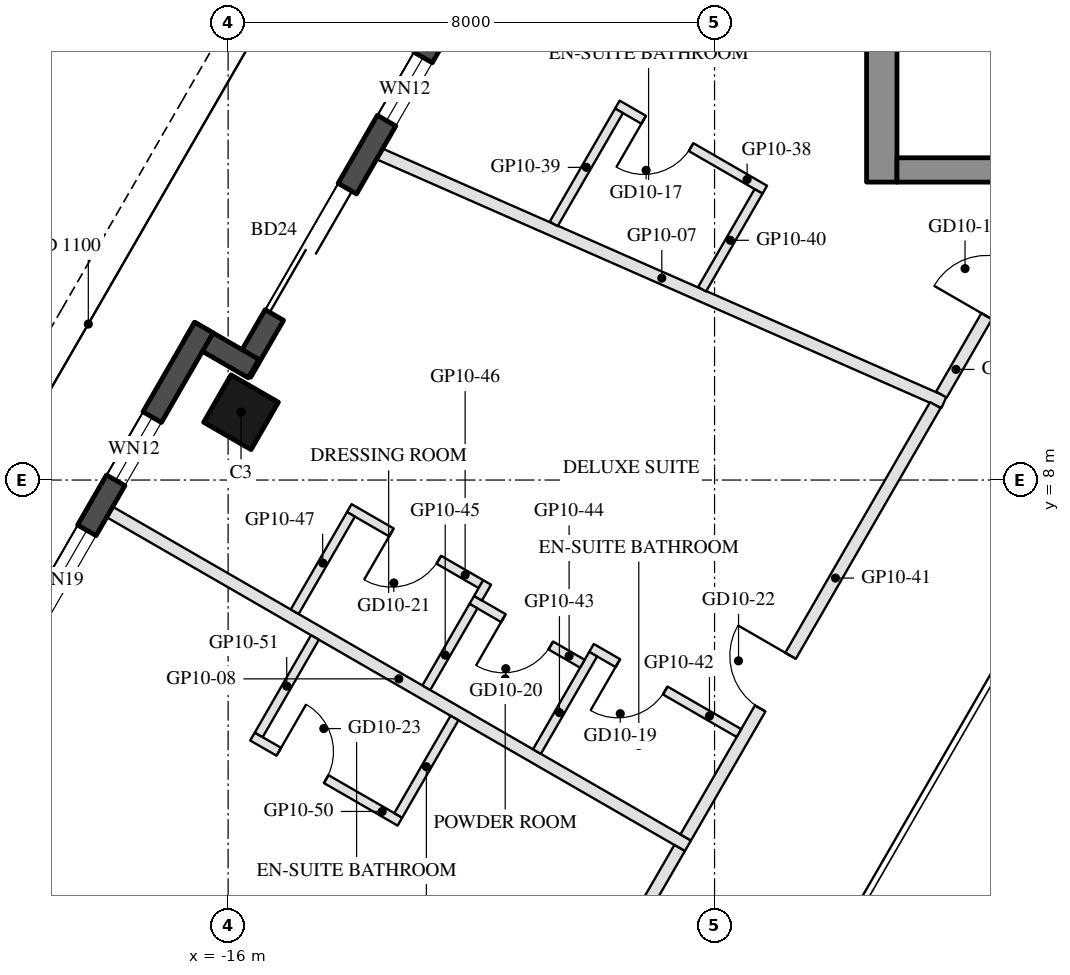
"""IFC4 building model, lengths in metres.
Left out: names, types, materials, properties, quantities, classifications, styles, units other than length and angle.
Written with IfcOpenShell. Run it as: python <this file> out.ifc"""

import sys

from ifc_helpers import new_model, si_unit, direction, frame, frame_2d, origin, origin_2d, place, context, subcontext, project, spatial, rectangle, hollow_rectangle, extrude, element, fill, save


model = new_model("IFC4")
c1 = context("Model", 3, precision=1e-05, world=origin(), true_north=direction((0.0, 1.0)))
c2 = subcontext(c1, "Body", "Model", "MODEL_VIEW")
j1 = project(units=[si_unit("LENGTHUNIT", "METRE"), si_unit("PLANEANGLEUNIT", "RADIAN")], contexts=[c1])
p1 = place(None, origin())
s1 = spatial("IfcSite", under=j1, at=p1, CompositionType="ELEMENT")
p2 = place(p1, origin())
s2 = spatial("IfcBuilding", under=s1, at=p2, CompositionType="ELEMENT")
p3 = place(p2, frame((0.0, 0.0, 120.5)))
s3 = spatial("IfcBuildingStorey", under=s2, at=p3, CompositionType="ELEMENT", Elevation=120.5)
p4 = place(p3, frame((-15.788, 9.115, 0.0), z_axis=(0.0, 0.0, 1.0), x_axis=(0.5, 0.866025403784, 0.0)))
e1 = element("IfcColumn", 1, at=p4, inside=s3, PredefinedType="COLUMN", context=c2, shape_type="SweptSolid", body=[
    extrude(hollow_rectangle(XDim=0.9, YDim=0.9, WallThickness=0.04, at=origin_2d()), origin(), (0.0, 0.0, 1.0), 3.7),
])
p5 = place(p3, frame((-12.409, 15.617, 0.0), z_axis=(0.0, 0.0, 1.0), x_axis=(-0.500003597184, -0.866023326939, 0.0)))
e2 = element("IfcWall", 2, at=p5, inside=s3, PredefinedType="SOLIDWALL", context=c2, shape_type="SweptSolid", body=[
    extrude(rectangle(XDim=6.74, YDim=0.35, at=frame_2d((3.37, 0.0))), origin(), (0.0, 0.0, 1.0), 3.55),
])
p6 = place(p5, frame((0.77, 0.0, 0.3)))
e3 = element("IfcOpeningElement", 3, at=p6, cuts=e2, PredefinedType="OPENING", context=c2, shape_type="SweptSolid", body=[
    extrude(rectangle(XDim=1.2, YDim=2.65, at=frame_2d((0.6, 1.325))), frame((0.0, 0.185, 0.0), z_axis=(0.0, -1.0, 0.0), x_axis=(1.0, 0.0, 0.0)), (0.0, 0.0, 1.0), 0.37),
])
p7 = place(p5, frame((3.26, 0.0, 0.0)))
e4 = element("IfcOpeningElement", 4, at=p7, cuts=e2, PredefinedType="OPENING", context=c2, shape_type="SweptSolid", body=[
    extrude(rectangle(XDim=2.4, YDim=2.4, at=frame_2d((1.2, 1.2))), frame((0.0, 0.185, 0.0), z_axis=(0.0, -1.0, 0.0), x_axis=(1.0, 0.0, 0.0)), (0.0, 0.0, 1.0), 0.37),
])
p8 = place(p3, frame((-15.581, 9.833, 0.0), z_axis=(0.0, 0.0, 1.0), x_axis=(-0.866055662726, 0.499947586314, 0.0)))
e5 = element("IfcWall", 5, at=p8, inside=s3, PredefinedType="SOLIDWALL", context=c2, shape_type="SweptSolid", body=[
    extrude(rectangle(XDim=1.22, YDim=0.35, at=frame_2d((0.61, 0.0))), origin(), (0.0, 0.0, 1.0), 3.55),
])
p9 = place(p3, frame((-16.398, 10.507, 0.0), z_axis=(0.0, 0.0, 1.0), x_axis=(-0.499999142773, -0.866025898704, 0.0)))
e6 = element("IfcWall", 6, at=p9, inside=s3, PredefinedType="SOLIDWALL", context=c2, shape_type="SweptSolid", body=[
    extrude(rectangle(XDim=9.7, YDim=0.35, at=frame_2d((4.85, 0.0))), origin(), (0.0, 0.0, 1.0), 3.55),
])
p10 = place(p9, frame((1.7, 0.0, 0.3)))
e7 = element("IfcOpeningElement", 7, at=p10, cuts=e6, PredefinedType="OPENING", context=c2, shape_type="SweptSolid", body=[
    extrude(rectangle(XDim=1.2, YDim=2.65, at=frame_2d((0.6, 1.325))), frame((0.0, 0.185, 0.0), z_axis=(0.0, -1.0, 0.0), x_axis=(1.0, 0.0, 0.0)), (0.0, 0.0, 1.0), 0.37),
])
p11 = place(p9, frame((3.85, 0.0, 0.3)))
e8 = element("IfcOpeningElement", 8, at=p11, cuts=e6, PredefinedType="OPENING", context=c2, shape_type="SweptSolid", body=[
    extrude(rectangle(XDim=1.9, YDim=2.65, at=frame_2d((0.95, 1.325))), frame((0.0, 0.185, 0.0), z_axis=(0.0, -1.0, 0.0), x_axis=(1.0, 0.0, 0.0)), (0.0, 0.0, 1.0), 0.37),
])
p12 = place(p9, frame((6.05, 0.0, 0.3)))
e9 = element("IfcOpeningElement", 9, at=p12, cuts=e6, PredefinedType="OPENING", context=c2, shape_type="SweptSolid", body=[
    extrude(rectangle(XDim=1.9, YDim=2.65, at=frame_2d((0.95, 1.325))), frame((0.0, 0.185, 0.0), z_axis=(0.0, -1.0, 0.0), x_axis=(1.0, 0.0, 0.0)), (0.0, 0.0, 1.0), 0.37),
])
p13 = place(p3, frame((-5.25, 12.9, 0.0), z_axis=(0.0, 0.0, 1.0), x_axis=(0.0, 1.0, 0.0)))
e10 = element("IfcWall", 10, at=p13, inside=s3, PredefinedType="SHEAR", context=c2, shape_type="SweptSolid", body=[
    extrude(rectangle(XDim=14.837, YDim=0.5, at=frame_2d((7.418, 0.0))), origin(), (0.0, 0.0, 1.0), 3.5),
])
p14 = place(p3, frame((5.0, 13.1, 0.0), z_axis=(0.0, 0.0, 1.0), x_axis=(-1.0, 0.0, 0.0)))
e11 = element("IfcWall", 11, at=p14, inside=s3, PredefinedType="SHEAR", context=c2, shape_type="SweptSolid", body=[
    extrude(rectangle(XDim=10.0, YDim=0.4, at=frame_2d((5.0, 0.0))), origin(), (0.0, 0.0, 1.0), 3.5),
])
p15 = place(p14, frame((3.55, 0.0, 0.0)))
e12 = element("IfcOpeningElement", 12, at=p15, cuts=e11, PredefinedType="OPENING", context=c2, shape_type="SweptSolid", body=[
    extrude(rectangle(XDim=1.1, YDim=2.1, at=frame_2d((0.55, 1.05))), frame((0.0, 0.21, 0.0), z_axis=(0.0, -1.0, 0.0), x_axis=(1.0, 0.0, 0.0)), (0.0, 0.0, 1.0), 0.42),
])
p16 = place(p14, frame((5.85, 0.0, 0.0)))
e13 = element("IfcOpeningElement", 13, at=p16, cuts=e11, PredefinedType="OPENING", context=c2, shape_type="SweptSolid", body=[
    extrude(rectangle(XDim=1.4, YDim=2.1, at=frame_2d((0.7, 1.05))), frame((0.0, 0.21, 0.0), z_axis=(0.0, -1.0, 0.0), x_axis=(1.0, 0.0, 0.0)), (0.0, 0.0, 1.0), 0.42),
])
p17 = place(p3, frame((-13.508, 13.363, 0.0), z_axis=(0.0, 0.0, 1.0), x_axis=(0.915297635711, -0.402778149932, 0.0)))
e14 = element("IfcWall", 14, at=p17, inside=s3, PredefinedType="PARTITIONING", context=c2, shape_type="SweptSolid", body=[
    extrude(rectangle(XDim=10.14, YDim=0.2, at=frame_2d((5.07, 0.0))), origin(), (0.0, 0.0, 1.0), 2.96),
])
p18 = place(p3, frame((-17.947, 7.475, 0.0), z_axis=(0.0, 0.0, 1.0), x_axis=(0.866027479907, -0.499996404033, 0.0)))
e15 = element("IfcWall", 15, at=p18, inside=s3, PredefinedType="PARTITIONING", context=c2, shape_type="SweptSolid", body=[
    extrude(rectangle(XDim=10.98, YDim=0.2, at=frame_2d((5.49, 0.0))), origin(), (0.0, 0.0, 1.0), 2.96),
])
p19 = place(p3, frame((-4.269, 9.406, 0.0), z_axis=(0.0, 0.0, 1.0), x_axis=(0.499968678846, 0.866043486306, 0.0)))
e16 = element("IfcWall", 16, at=p19, inside=s3, PredefinedType="PARTITIONING", context=c2, shape_type="SweptSolid", body=[
    extrude(rectangle(XDim=3.977, YDim=0.2, at=frame_2d((1.988, 0.0))), origin(), (0.0, 0.0, 1.0), 2.95),
])
p20 = place(p19, frame((1.488, 0.0, 0.0)))
e17 = element("IfcOpeningElement", 17, at=p20, cuts=e16, PredefinedType="OPENING", context=c2, shape_type="SweptSolid", body=[
    extrude(rectangle(XDim=1.0, YDim=2.1, at=frame_2d((0.5, 1.05))), frame((0.0, 0.11, 0.0), z_axis=(0.0, -1.0, 0.0), x_axis=(1.0, 0.0, 0.0)), (0.0, 0.0, 1.0), 0.22),
])
p21 = place(p3, frame((-7.174, 12.775, 0.0), z_axis=(0.0, 0.0, 1.0), x_axis=(-0.866034573852, 0.49998411664, 0.0)))
e18 = element("IfcWall", 18, at=p21, inside=s3, PredefinedType="PARTITIONING", context=c2, shape_type="SweptSolid", body=[
    extrude(rectangle(XDim=2.8, YDim=0.15, at=frame_2d((1.4, 0.0))), origin(), (0.0, 0.0, 1.0), 3.55),
])
p22 = place(p21, frame((1.4, 0.0, 0.0)))
e19 = element("IfcOpeningElement", 19, at=p22, cuts=e18, PredefinedType="OPENING", context=c2, shape_type="SweptSolid", body=[
    extrude(rectangle(XDim=0.9, YDim=2.1, at=frame_2d((0.45, 1.05))), frame((0.0, 0.085, 0.0), z_axis=(0.0, -1.0, 0.0), x_axis=(1.0, 0.0, 0.0)), (0.0, 0.0, 1.0), 0.17),
])
p23 = place(p3, frame((-9.571, 14.073, 0.0), z_axis=(0.0, 0.0, 1.0), x_axis=(-0.50005036918, -0.865996321171, 0.0)))
e20 = element("IfcWall", 20, at=p23, inside=s3, PredefinedType="PARTITIONING", context=c2, shape_type="SweptSolid", body=[
    extrude(rectangle(XDim=2.148, YDim=0.15, at=frame_2d((1.074, 0.0))), origin(), (0.0, 0.0, 1.0), 3.55),
])
p24 = place(p3, frame((-7.276, 12.748, 0.0), z_axis=(0.0, 0.0, 1.0), x_axis=(-0.500067438192, -0.865986464825, 0.0)))
e21 = element("IfcWall", 21, at=p24, inside=s3, PredefinedType="PARTITIONING", context=c2, shape_type="SweptSolid", body=[
    extrude(rectangle(XDim=1.858, YDim=0.15, at=frame_2d((0.929, 0.0))), origin(), (0.0, 0.0, 1.0), 3.55),
])
p25 = place(p3, frame((-8.475, 2.122, 0.0), z_axis=(0.0, 0.0, 1.0), x_axis=(0.500005592383, 0.866022174996, 0.0)))
e22 = element("IfcWall", 22, at=p25, inside=s3, PredefinedType="PARTITIONING", context=c2, shape_type="SweptSolid", body=[
    extrude(rectangle(XDim=8.21, YDim=0.2, at=frame_2d((4.105, 0.0))), origin(), (0.0, 0.0, 1.0), 2.95),
])
p26 = place(p25, frame((2.45, 0.0, 0.0)))
e23 = element("IfcOpeningElement", 23, at=p26, cuts=e22, PredefinedType="OPENING", context=c2, shape_type="SweptSolid", body=[
    extrude(rectangle(XDim=1.0, YDim=2.1, at=frame_2d((0.5, 1.05))), frame((0.0, 0.11, 0.0), z_axis=(0.0, -1.0, 0.0), x_axis=(1.0, 0.0, 0.0)), (0.0, 0.0, 1.0), 0.22),
])
p27 = place(p3, frame((-7.599, 3.839, 0.0), z_axis=(0.0, 0.0, 1.0), x_axis=(-0.866056369097, 0.49994636267, 0.0)))
e24 = element("IfcWall", 24, at=p27, inside=s3, PredefinedType="PARTITIONING", context=c2, shape_type="SweptSolid", body=[
    extrude(rectangle(XDim=2.8, YDim=0.15, at=frame_2d((1.4, 0.0))), origin(), (0.0, 0.0, 1.0), 3.55),
])
p28 = place(p27, frame((1.4, 0.0, 0.0)))
e25 = element("IfcOpeningElement", 25, at=p28, cuts=e24, PredefinedType="OPENING", context=c2, shape_type="SweptSolid", body=[
    extrude(rectangle(XDim=0.9, YDim=2.1, at=frame_2d((0.45, 1.05))), frame((0.0, 0.085, 0.0), z_axis=(0.0, -1.0, 0.0), x_axis=(1.0, 0.0, 0.0)), (0.0, 0.0, 1.0), 0.17),
])
p29 = place(p3, frame((-9.996, 5.136, 0.0), z_axis=(0.0, 0.0, 1.0), x_axis=(-0.499985172903, -0.866033964044, 0.0)))
e26 = element("IfcWall", 26, at=p29, inside=s3, PredefinedType="PARTITIONING", context=c2, shape_type="SweptSolid", body=[
    extrude(rectangle(XDim=1.85, YDim=0.15, at=frame_2d((0.925, 0.0))), origin(), (0.0, 0.0, 1.0), 3.55),
])
p30 = place(p3, frame((-10.174, 4.979, 0.0), z_axis=(0.0, 0.0, 1.0), x_axis=(-0.866009402589, 0.500027713859, 0.0)))
e27 = element("IfcWall", 27, at=p30, inside=s3, PredefinedType="PARTITIONING", context=c2, shape_type="SweptSolid", body=[
    extrude(rectangle(XDim=2.1, YDim=0.15, at=frame_2d((1.05, 0.0))), origin(), (0.0, 0.0, 1.0), 3.55),
])
p31 = place(p30, frame((0.6, 0.0, 0.0)))
e28 = element("IfcOpeningElement", 28, at=p31, cuts=e27, PredefinedType="OPENING", context=c2, shape_type="SweptSolid", body=[
    extrude(rectangle(XDim=0.9, YDim=2.1, at=frame_2d((0.45, 1.05))), frame((0.0, 0.085, 0.0), z_axis=(0.0, -1.0, 0.0), x_axis=(1.0, 0.0, 0.0)), (0.0, 0.0, 1.0), 0.17),
])
p32 = place(p3, frame((-11.965, 5.927, 0.0), z_axis=(0.0, 0.0, 1.0), x_axis=(-0.499899694197, -0.866083307622, 0.0)))
e29 = element("IfcWall", 29, at=p32, inside=s3, PredefinedType="PARTITIONING", context=c2, shape_type="SweptSolid", body=[
    extrude(rectangle(XDim=1.55, YDim=0.15, at=frame_2d((0.775, 0.0))), origin(), (0.0, 0.0, 1.0), 3.55),
])
p33 = place(p3, frame((-11.842, 6.289, 0.0), z_axis=(0.0, 0.0, 1.0), x_axis=(-0.866022959057, 0.500004234368, 0.0)))
e30 = element("IfcWall", 30, at=p33, inside=s3, PredefinedType="PARTITIONING", context=c2, shape_type="SweptSolid", body=[
    extrude(rectangle(XDim=2.5, YDim=0.15, at=frame_2d((1.25, 0.0))), origin(), (0.0, 0.0, 1.0), 3.55),
])
p34 = place(p33, frame((0.8, 0.0, 0.0)))
e31 = element("IfcOpeningElement", 31, at=p34, cuts=e30, PredefinedType="OPENING", context=c2, shape_type="SweptSolid", body=[
    extrude(rectangle(XDim=0.9, YDim=2.1, at=frame_2d((0.45, 1.05))), frame((0.0, 0.085, 0.0), z_axis=(0.0, -1.0, 0.0), x_axis=(1.0, 0.0, 0.0)), (0.0, 0.0, 1.0), 0.17),
])
p35 = place(p3, frame((-13.98, 7.436, 0.0), z_axis=(0.0, 0.0, 1.0), x_axis=(-0.499886193382, -0.866091100096, 0.0)))
e32 = element("IfcWall", 32, at=p35, inside=s3, PredefinedType="PARTITIONING", context=c2, shape_type="SweptSolid", body=[
    extrude(rectangle(XDim=1.85, YDim=0.15, at=frame_2d((0.925, 0.0))), origin(), (0.0, 0.0, 1.0), 3.55),
])
p36 = place(p3, frame((-11.74, 6.316, 0.0), z_axis=(0.0, 0.0, 1.0), x_axis=(-0.500426713919, -0.865778900179, 0.0)))
e33 = element("IfcWall", 33, at=p36, inside=s3, PredefinedType="PARTITIONING", context=c2, shape_type="SweptSolid", body=[
    extrude(rectangle(XDim=0.3, YDim=0.15, at=frame_2d((0.15, 0.0))), origin(), (0.0, 0.0, 1.0), 3.55),
])
p37 = place(p3, frame((-12.269, -4.45, 0.0), z_axis=(0.0, 0.0, 1.0), x_axis=(0.500009454961, 0.866019944892, 0.0)))
e34 = element("IfcWall", 34, at=p37, inside=s3, PredefinedType="PARTITIONING", context=c2, shape_type="SweptSolid", body=[
    extrude(rectangle(XDim=7.388, YDim=0.2, at=frame_2d((3.694, 0.0))), origin(), (0.0, 0.0, 1.0), 2.95),
])
p38 = place(p37, frame((3.194, 0.0, 0.0)))
e35 = element("IfcOpeningElement", 35, at=p38, cuts=e34, PredefinedType="OPENING", context=c2, shape_type="SweptSolid", body=[
    extrude(rectangle(XDim=1.0, YDim=2.1, at=frame_2d((0.5, 1.05))), frame((0.0, 0.11, 0.0), z_axis=(0.0, -1.0, 0.0), x_axis=(1.0, 0.0, 0.0)), (0.0, 0.0, 1.0), 0.22),
])
p39 = place(p3, frame((-15.599, 3.781, 0.0), z_axis=(0.0, 0.0, 1.0), x_axis=(0.866018616679, -0.500011755427, 0.0)))
e36 = element("IfcWall", 36, at=p39, inside=s3, PredefinedType="PARTITIONING", context=c2, shape_type="SweptSolid", body=[
    extrude(rectangle(XDim=2.8, YDim=0.15, at=frame_2d((1.4, 0.0))), origin(), (0.0, 0.0, 1.0), 3.55),
])
p40 = place(p39, frame((0.5, 0.0, 0.0)))
e37 = element("IfcOpeningElement", 37, at=p40, cuts=e36, PredefinedType="OPENING", context=c2, shape_type="SweptSolid", body=[
    extrude(rectangle(XDim=0.9, YDim=2.1, at=frame_2d((0.45, 1.05))), frame((0.0, 0.085, 0.0), z_axis=(0.0, -1.0, 0.0), x_axis=(1.0, 0.0, 0.0)), (0.0, 0.0, 1.0), 0.17),
])
p41 = place(p3, frame((-14.572, 5.411, 0.0), z_axis=(0.0, 0.0, 1.0), x_axis=(-0.499985172903, -0.866033964044, 0.0)))
e38 = element("IfcWall", 38, at=p41, inside=s3, PredefinedType="PARTITIONING", context=c2, shape_type="SweptSolid", body=[
    extrude(rectangle(XDim=1.85, YDim=0.15, at=frame_2d((0.925, 0.0))), origin(), (0.0, 0.0, 1.0), 2.95),
])
p42 = place(p3, frame((-12.277, 4.086, 0.0), z_axis=(0.0, 0.0, 1.0), x_axis=(-0.500042316284, -0.866000971088, 0.0)))
e39 = element("IfcWall", 39, at=p42, inside=s3, PredefinedType="PARTITIONING", context=c2, shape_type="SweptSolid", body=[
    extrude(rectangle(XDim=1.85, YDim=0.15, at=frame_2d((0.925, 0.0))), origin(), (0.0, 0.0, 1.0), 2.95),
])
p43 = place(p6, origin())
e40 = element("IfcWindow", 40, at=p43, inside=s3, PartitioningType="SINGLE_PANEL", PredefinedType="WINDOW", context=c2, shape_type="SweptSolid", body=[
    extrude(rectangle(XDim=1.2, YDim=2.65, at=frame_2d((0.6, 1.325))), frame((0.0, 0.03, 0.0), z_axis=(0.0, -1.0, 0.0), x_axis=(1.0, 0.0, 0.0)), (0.0, 0.0, 1.0), 0.06),
])
fill(e3, e40)
p44 = place(p7, frame((2.4, 0.0, 0.0), z_axis=(0.0, 0.0, 1.0), x_axis=(-1.0, 0.0, 0.0)))
e41 = element("IfcDoor", 41, at=p44, inside=s3, OperationType="SLIDING_TO_LEFT", PredefinedType="DOOR", context=c2, shape_type="SweptSolid", body=[
    extrude(rectangle(XDim=2.4, YDim=2.4, at=frame_2d((1.2, 1.2))), frame((0.0, 0.025, 0.0), z_axis=(0.0, -1.0, 0.0), x_axis=(1.0, 0.0, 0.0)), (0.0, 0.0, 1.0), 0.05),
])
fill(e4, e41)
p45 = place(p10, origin())
e42 = element("IfcWindow", 42, at=p45, inside=s3, PartitioningType="SINGLE_PANEL", PredefinedType="WINDOW", context=c2, shape_type="SweptSolid", body=[
    extrude(rectangle(XDim=1.2, YDim=2.65, at=frame_2d((0.6, 1.325))), frame((0.0, 0.03, 0.0), z_axis=(0.0, -1.0, 0.0), x_axis=(1.0, 0.0, 0.0)), (0.0, 0.0, 1.0), 0.06),
])
fill(e7, e42)
p46 = place(p11, origin())
e43 = element("IfcWindow", 43, at=p46, inside=s3, PartitioningType="SINGLE_PANEL", PredefinedType="WINDOW", context=c2, shape_type="SweptSolid", body=[
    extrude(rectangle(XDim=1.9, YDim=2.65, at=frame_2d((0.95, 1.325))), frame((0.0, 0.03, 0.0), z_axis=(0.0, -1.0, 0.0), x_axis=(1.0, 0.0, 0.0)), (0.0, 0.0, 1.0), 0.06),
])
fill(e8, e43)
p47 = place(p22, origin())
e44 = element("IfcDoor", 44, at=p47, inside=s3, OperationType="SINGLE_SWING_RIGHT", PredefinedType="DOOR", context=c2, shape_type="SweptSolid", body=[
    extrude(rectangle(XDim=0.9, YDim=2.1, at=frame_2d((0.45, 1.05))), frame((0.0, 0.025, 0.0), z_axis=(0.0, -1.0, 0.0), x_axis=(1.0, 0.0, 0.0)), (0.0, 0.0, 1.0), 0.05),
])
fill(e19, e44)
p48 = place(p20, origin())
e45 = element("IfcDoor", 45, at=p48, inside=s3, OperationType="SINGLE_SWING_LEFT", PredefinedType="DOOR", context=c2, shape_type="SweptSolid", body=[
    extrude(rectangle(XDim=1.0, YDim=2.1, at=frame_2d((0.5, 1.05))), frame((0.0, 0.025, 0.0), z_axis=(0.0, -1.0, 0.0), x_axis=(1.0, 0.0, 0.0)), (0.0, 0.0, 1.0), 0.05),
])
fill(e17, e45)
p49 = place(p28, origin())
e46 = element("IfcDoor", 46, at=p49, inside=s3, OperationType="SINGLE_SWING_RIGHT", PredefinedType="DOOR", context=c2, shape_type="SweptSolid", body=[
    extrude(rectangle(XDim=0.9, YDim=2.1, at=frame_2d((0.45, 1.05))), frame((0.0, 0.025, 0.0), z_axis=(0.0, -1.0, 0.0), x_axis=(1.0, 0.0, 0.0)), (0.0, 0.0, 1.0), 0.05),
])
fill(e25, e46)
p50 = place(p31, origin())
e47 = element("IfcDoor", 47, at=p50, inside=s3, OperationType="SINGLE_SWING_RIGHT", PredefinedType="DOOR", context=c2, shape_type="SweptSolid", body=[
    extrude(rectangle(XDim=0.9, YDim=2.1, at=frame_2d((0.45, 1.05))), frame((0.0, 0.025, 0.0), z_axis=(0.0, -1.0, 0.0), x_axis=(1.0, 0.0, 0.0)), (0.0, 0.0, 1.0), 0.05),
])
fill(e28, e47)
p51 = place(p34, origin())
e48 = element("IfcDoor", 48, at=p51, inside=s3, OperationType="SINGLE_SWING_RIGHT", PredefinedType="DOOR", context=c2, shape_type="SweptSolid", body=[
    extrude(rectangle(XDim=0.9, YDim=2.1, at=frame_2d((0.45, 1.05))), frame((0.0, 0.025, 0.0), z_axis=(0.0, -1.0, 0.0), x_axis=(1.0, 0.0, 0.0)), (0.0, 0.0, 1.0), 0.05),
])
fill(e31, e48)
p52 = place(p26, origin())
e49 = element("IfcDoor", 49, at=p52, inside=s3, OperationType="SINGLE_SWING_RIGHT", PredefinedType="DOOR", context=c2, shape_type="SweptSolid", body=[
    extrude(rectangle(XDim=1.0, YDim=2.1, at=frame_2d((0.5, 1.05))), frame((0.0, 0.025, 0.0), z_axis=(0.0, -1.0, 0.0), x_axis=(1.0, 0.0, 0.0)), (0.0, 0.0, 1.0), 0.05),
])
fill(e23, e49)
p53 = place(p40, origin())
e50 = element("IfcDoor", 50, at=p53, inside=s3, OperationType="SINGLE_SWING_LEFT", PredefinedType="DOOR", context=c2, shape_type="SweptSolid", body=[
    extrude(rectangle(XDim=0.9, YDim=2.1, at=frame_2d((0.45, 1.05))), frame((0.0, 0.025, 0.0), z_axis=(0.0, -1.0, 0.0), x_axis=(1.0, 0.0, 0.0)), (0.0, 0.0, 1.0), 0.05),
])
fill(e37, e50)
save(model, sys.argv[1])
